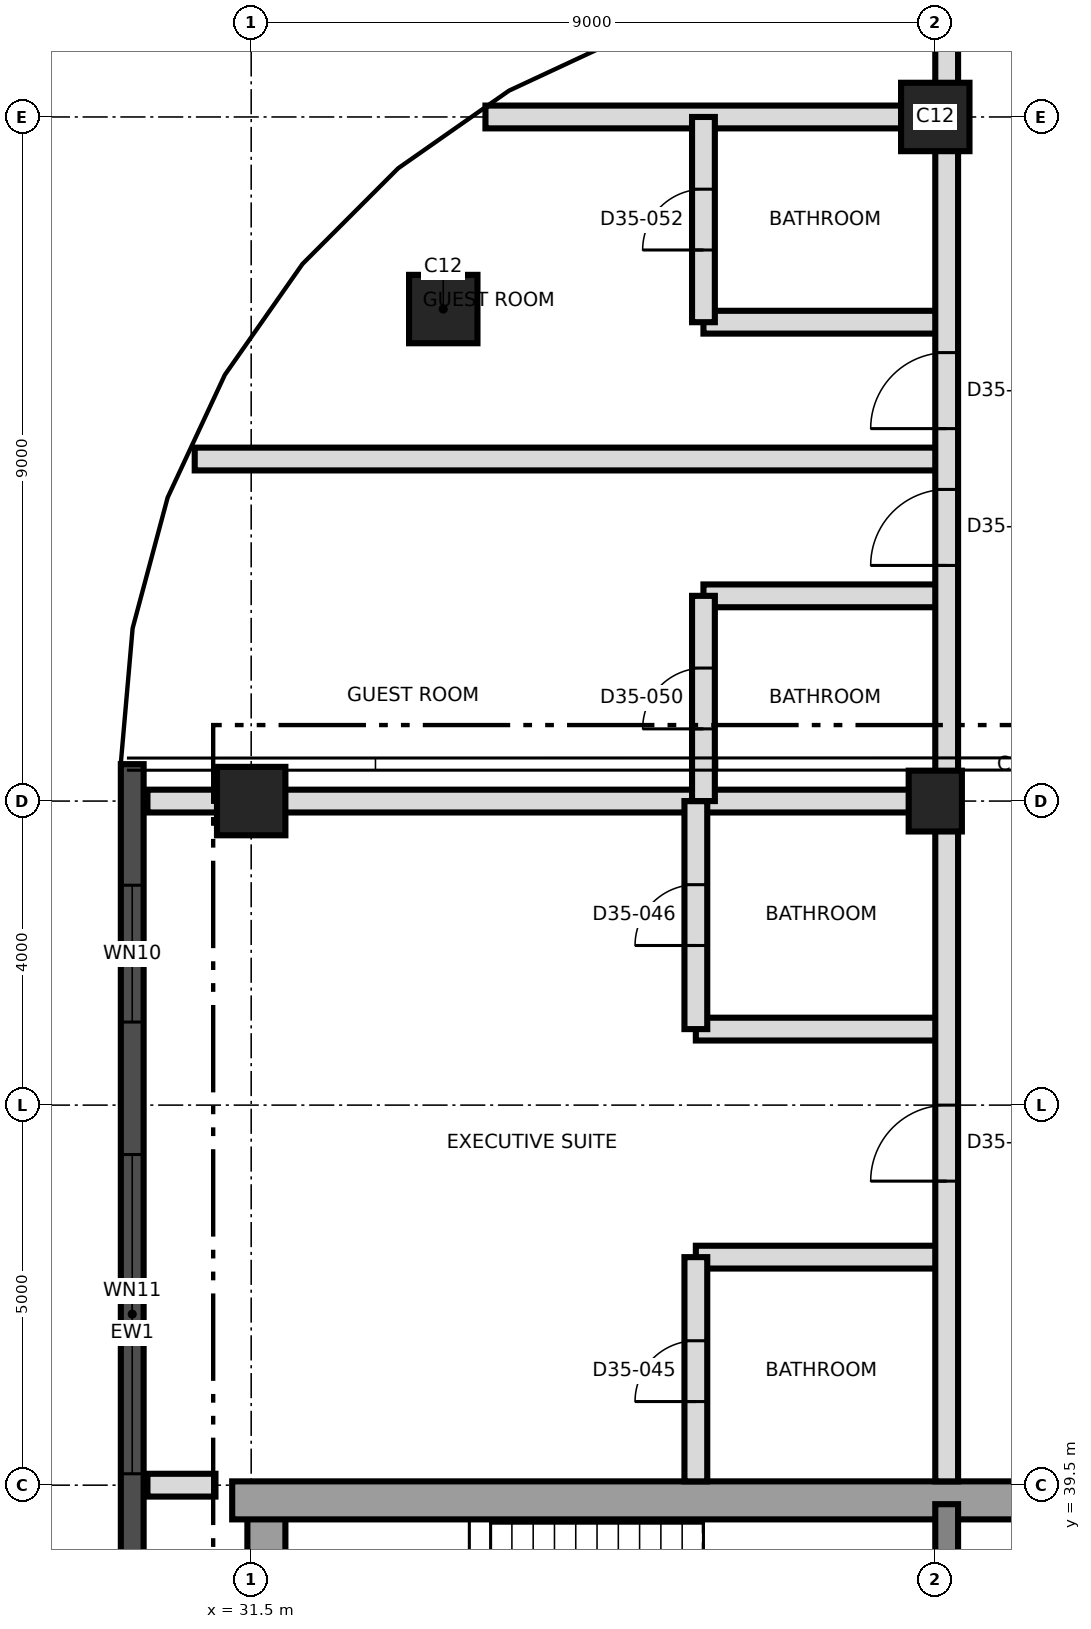
"""IFC4 building model, lengths in metres.
Left out: names, types, materials, properties, quantities, classifications, styles, units other than length and angle.
Written with IfcOpenShell. Run it as: python <this file> out.ifc"""

import sys

from ifc_helpers import new_model, si_unit, direction, frame, frame_2d, origin, origin_2d, place, context, subcontext, project, spatial, rectangle, extrude, element, fill, save


model = new_model("IFC4")
c1 = context("Model", 3, precision=1e-05, world=origin(), true_north=direction((0.0, 1.0)))
c2 = subcontext(c1, "Body", "Model", "MODEL_VIEW")
j1 = project(units=[si_unit("LENGTHUNIT", "METRE"), si_unit("PLANEANGLEUNIT", "RADIAN")], contexts=[c1])
p1 = place(None, origin())
s1 = spatial("IfcSite", under=j1, at=p1, CompositionType="ELEMENT")
p2 = place(p1, origin())
s2 = spatial("IfcBuilding", under=s1, at=p2, CompositionType="ELEMENT")
p3 = place(p2, frame((0.0, 0.0, 195.8)))
s3 = spatial("IfcBuildingStorey", under=s2, at=p3, CompositionType="ELEMENT", Elevation=195.8)
p4 = place(p3, frame((31.7, 21.75, 0.0), z_axis=(0.0, 0.0, 1.0), x_axis=(0.0, 1.0, 0.0)))
e1 = element("IfcWall", 1, at=p4, inside=s3, PredefinedType="SHEAR", context=c2, shape_type="SweptSolid", body=[
    extrude(rectangle(XDim=17.5, YDim=0.5, at=frame_2d((8.75, 0.0))), origin(), (0.0, 0.0, 1.0), 3.7),
])
p5 = place(p3, frame((31.25, 39.3, 0.0), z_axis=(0.0, 0.0, 1.0), x_axis=(1.0, 0.0, 0.0)))
e2 = element("IfcWall", 2, at=p5, inside=s3, PredefinedType="SHEAR", context=c2, shape_type="SweptSolid", body=[
    extrude(rectangle(XDim=27.0, YDim=0.5, at=frame_2d((13.5, 0.0))), origin(), (0.0, 0.0, 1.0), 3.7),
])
p6 = place(p5, frame((10.45, 0.0, 0.0)))
e3 = element("IfcOpeningElement", 3, at=p6, cuts=e2, PredefinedType="OPENING", context=c2, shape_type="SweptSolid", body=[
    extrude(rectangle(XDim=1.2, YDim=2.1, at=frame_2d((0.6, 1.05))), frame((0.0, 0.26, 0.0), z_axis=(0.0, -1.0, 0.0), x_axis=(1.0, 0.0, 0.0)), (0.0, 0.0, 1.0), 0.52),
])
p7 = place(p3, frame((40.65, 33.5, 0.0), z_axis=(0.0, 0.0, 1.0), x_axis=(0.0, 1.0, 0.0)))
e4 = element("IfcWall", 4, at=p7, inside=s3, PredefinedType="SHEAR", context=c2, shape_type="SweptSolid", body=[
    extrude(rectangle(XDim=5.75, YDim=0.3, at=frame_2d((2.875, 0.0))), origin(), (0.0, 0.0, 1.0), 3.7),
])
p8 = place(p3, frame((31.5, 48.5, 0.0), z_axis=(0.0, 0.0, 1.0), x_axis=(1.0, 0.0, 0.0)))
e5 = element("IfcColumn", 5, at=p8, inside=s3, PredefinedType="COLUMN", context=c2, shape_type="SweptSolid", body=[
    extrude(rectangle(XDim=0.9, YDim=0.9, at=origin_2d()), origin(), (0.0, 0.0, 1.0), 3.7),
])
p9 = place(p3, frame((40.5, 48.5, 0.0), z_axis=(0.0, 0.0, 1.0), x_axis=(0.0, 1.0, 0.0)))
e6 = element("IfcColumn", 6, at=p9, inside=s3, PredefinedType="COLUMN", context=c2, shape_type="SweptSolid", body=[
    extrude(rectangle(XDim=0.8, YDim=0.7, at=origin_2d()), origin(), (0.0, 0.0, 1.0), 3.7),
])
for number, where, z_axis, x_axis in (
    (7, (34.027, 54.973, 0.0), (0.0, 0.0, 1.0), (1.0, 0.0, 0.0)),
    (8, (40.5, 57.5, 0.0), (0.0, 0.0, 1.0), (1.0, 0.0, 0.0)),
):
    element("IfcColumn", number, at=place(p3, frame(where, z_axis=z_axis, x_axis=x_axis)), inside=s3, PredefinedType="COLUMN", context=c2, shape_type="SweptSolid", body=[
        extrude(rectangle(XDim=0.9, YDim=0.9, at=origin_2d()), origin(), (0.0, 0.0, 1.0), 3.7),
    ])
p10 = place(p3, frame((29.935, 48.986, 0.0), z_axis=(0.0, 0.0, 1.0), x_axis=(0.0, -1.0, 0.0)))
e9 = element("IfcWall", 9, at=p10, inside=s3, PredefinedType="SOLIDWALL", context=c2, shape_type="SweptSolid", body=[
    extrude(rectangle(XDim=14.976, YDim=0.3, at=frame_2d((7.488, 0.0))), origin(), (0.0, 0.0, 1.0), 3.4),
])
p11 = place(p10, frame((1.593, 0.0, 0.3)))
e10 = element("IfcOpeningElement", 10, at=p11, cuts=e9, PredefinedType="OPENING", context=c2, shape_type="SweptSolid", body=[
    extrude(rectangle(XDim=1.8, YDim=2.4, at=frame_2d((0.9, 1.2))), frame((0.0, 0.16, 0.0), z_axis=(0.0, -1.0, 0.0), x_axis=(1.0, 0.0, 0.0)), (0.0, 0.0, 1.0), 0.32),
])
p12 = place(p10, frame((5.136, 0.0, 0.9)))
e11 = element("IfcOpeningElement", 11, at=p12, cuts=e9, PredefinedType="OPENING", context=c2, shape_type="SweptSolid", body=[
    extrude(rectangle(XDim=4.2, YDim=1.5, at=frame_2d((2.1, 0.75))), frame((0.0, 0.16, 0.0), z_axis=(0.0, -1.0, 0.0), x_axis=(1.0, 0.0, 0.0)), (0.0, 0.0, 1.0), 0.32),
])
p13 = place(p10, frame((11.331, 0.0, 0.3)))
e12 = element("IfcOpeningElement", 12, at=p13, cuts=e9, PredefinedType="OPENING", context=c2, shape_type="SweptSolid", body=[
    extrude(rectangle(XDim=1.8, YDim=2.4, at=frame_2d((0.9, 1.2))), frame((0.0, 0.16, 0.0), z_axis=(0.0, -1.0, 0.0), x_axis=(1.0, 0.0, 0.0)), (0.0, 0.0, 1.0), 0.32),
])
p14 = place(p3, frame((30.135, 39.5, 0.0), z_axis=(0.0, 0.0, 1.0), x_axis=(1.0, 0.0, 0.0)))
e13 = element("IfcWall", 13, at=p14, inside=s3, PredefinedType="PARTITIONING", context=c2, shape_type="SweptSolid", body=[
    extrude(rectangle(XDim=0.895, YDim=0.3, at=frame_2d((0.448, 0.0))), origin(), (0.0, 0.0, 1.0), 3.4),
])
for number, where, z_axis, x_axis in (
    (14, (37.35, 42.5, 0.0), (0.0, 0.0, 1.0), (1.0, 0.0, 0.0)),
    (15, (37.35, 45.5, 0.0), (0.0, 0.0, 1.0), (1.0, 0.0, 0.0)),
):
    element("IfcWall", number, at=place(p3, frame(where, z_axis=z_axis, x_axis=x_axis)), inside=s3, PredefinedType="PARTITIONING", context=c2, shape_type="SweptSolid", body=[
        extrude(rectangle(XDim=3.3, YDim=0.3, at=frame_2d((1.65, 0.0))), origin(), (0.0, 0.0, 1.0), 3.4),
    ])
p15 = place(p3, frame((30.135, 48.5, 0.0), z_axis=(0.0, 0.0, 1.0), x_axis=(1.0, 0.0, 0.0)))
e16 = element("IfcWall", 16, at=p15, inside=s3, PredefinedType="PARTITIONING", context=c2, shape_type="SweptSolid", body=[
    extrude(rectangle(XDim=10.515, YDim=0.3, at=frame_2d((5.257, 0.0))), origin(), (0.0, 0.0, 1.0), 3.4),
])
p16 = place(p3, frame((37.45, 51.2, 0.0), z_axis=(0.0, 0.0, 1.0), x_axis=(1.0, 0.0, 0.0)))
e17 = element("IfcWall", 17, at=p16, inside=s3, PredefinedType="PARTITIONING", context=c2, shape_type="SweptSolid", body=[
    extrude(rectangle(XDim=3.2, YDim=0.3, at=frame_2d((1.6, 0.0))), origin(), (0.0, 0.0, 1.0), 3.4),
])
p17 = place(p3, frame((30.757, 53.0, 0.0), z_axis=(0.0, 0.0, 1.0), x_axis=(1.0, 0.0, 0.0)))
e18 = element("IfcWall", 18, at=p17, inside=s3, PredefinedType="PARTITIONING", context=c2, shape_type="SweptSolid", body=[
    extrude(rectangle(XDim=9.893, YDim=0.3, at=frame_2d((4.946, 0.0))), origin(), (0.0, 0.0, 1.0), 3.4),
])
p18 = place(p3, frame((37.45, 54.8, 0.0), z_axis=(0.0, 0.0, 1.0), x_axis=(1.0, 0.0, 0.0)))
e19 = element("IfcWall", 19, at=p18, inside=s3, PredefinedType="PARTITIONING", context=c2, shape_type="SweptSolid", body=[
    extrude(rectangle(XDim=3.2, YDim=0.3, at=frame_2d((1.6, 0.0))), origin(), (0.0, 0.0, 1.0), 3.4),
])
p19 = place(p3, frame((34.582, 57.5, 0.0), z_axis=(0.0, 0.0, 1.0), x_axis=(1.0, 0.0, 0.0)))
e20 = element("IfcWall", 20, at=p19, inside=s3, PredefinedType="PARTITIONING", context=c2, shape_type="SweptSolid", body=[
    extrude(rectangle(XDim=6.068, YDim=0.3, at=frame_2d((3.034, 0.0))), origin(), (0.0, 0.0, 1.0), 3.4),
])
p20 = place(p3, frame((37.35, 39.55, 0.0), z_axis=(0.0, 0.0, 1.0), x_axis=(0.0, 1.0, 0.0)))
e21 = element("IfcWall", 21, at=p20, inside=s3, PredefinedType="PARTITIONING", context=c2, shape_type="SweptSolid", body=[
    extrude(rectangle(XDim=2.95, YDim=0.3, at=frame_2d((1.475, 0.0))), origin(), (0.0, 0.0, 1.0), 3.4),
])
p21 = place(p20, frame((1.05, 0.0, 0.0)))
e22 = element("IfcOpeningElement", 22, at=p21, cuts=e21, PredefinedType="OPENING", context=c2, shape_type="SweptSolid", body=[
    extrude(rectangle(XDim=0.8, YDim=2.1, at=frame_2d((0.4, 1.05))), frame((0.0, 0.16, 0.0), z_axis=(0.0, -1.0, 0.0), x_axis=(1.0, 0.0, 0.0)), (0.0, 0.0, 1.0), 0.32),
])
p22 = place(p3, frame((37.35, 45.5, 0.0), z_axis=(0.0, 0.0, 1.0), x_axis=(0.0, 1.0, 0.0)))
e23 = element("IfcWall", 23, at=p22, inside=s3, PredefinedType="PARTITIONING", context=c2, shape_type="SweptSolid", body=[
    extrude(rectangle(XDim=3.0, YDim=0.3, at=frame_2d((1.5, 0.0))), origin(), (0.0, 0.0, 1.0), 3.4),
])
p23 = place(p22, frame((1.1, 0.0, 0.0)))
e24 = element("IfcOpeningElement", 24, at=p23, cuts=e23, PredefinedType="OPENING", context=c2, shape_type="SweptSolid", body=[
    extrude(rectangle(XDim=0.8, YDim=2.1, at=frame_2d((0.4, 1.05))), frame((0.0, 0.16, 0.0), z_axis=(0.0, -1.0, 0.0), x_axis=(1.0, 0.0, 0.0)), (0.0, 0.0, 1.0), 0.32),
])
p24 = place(p3, frame((37.45, 48.5, 0.0), z_axis=(0.0, 0.0, 1.0), x_axis=(0.0, 1.0, 0.0)))
e25 = element("IfcWall", 25, at=p24, inside=s3, PredefinedType="PARTITIONING", context=c2, shape_type="SweptSolid", body=[
    extrude(rectangle(XDim=2.7, YDim=0.3, at=frame_2d((1.35, 0.0))), origin(), (0.0, 0.0, 1.0), 3.4),
])
p25 = place(p24, frame((0.95, 0.0, 0.0)))
e26 = element("IfcOpeningElement", 26, at=p25, cuts=e25, PredefinedType="OPENING", context=c2, shape_type="SweptSolid", body=[
    extrude(rectangle(XDim=0.8, YDim=2.1, at=frame_2d((0.4, 1.05))), frame((0.0, 0.16, 0.0), z_axis=(0.0, -1.0, 0.0), x_axis=(1.0, 0.0, 0.0)), (0.0, 0.0, 1.0), 0.32),
])
p26 = place(p3, frame((37.45, 54.8, 0.0), z_axis=(0.0, 0.0, 1.0), x_axis=(0.0, 1.0, 0.0)))
e27 = element("IfcWall", 27, at=p26, inside=s3, PredefinedType="PARTITIONING", context=c2, shape_type="SweptSolid", body=[
    extrude(rectangle(XDim=2.7, YDim=0.3, at=frame_2d((1.35, 0.0))), origin(), (0.0, 0.0, 1.0), 3.4),
])
p27 = place(p26, frame((0.95, 0.0, 0.0)))
e28 = element("IfcOpeningElement", 28, at=p27, cuts=e27, PredefinedType="OPENING", context=c2, shape_type="SweptSolid", body=[
    extrude(rectangle(XDim=0.8, YDim=2.1, at=frame_2d((0.4, 1.05))), frame((0.0, 0.16, 0.0), z_axis=(0.0, -1.0, 0.0), x_axis=(1.0, 0.0, 0.0)), (0.0, 0.0, 1.0), 0.32),
])
p28 = place(p3, frame((40.65, 39.55, 0.0), z_axis=(0.0, 0.0, 1.0), x_axis=(0.0, 1.0, 0.0)))
e29 = element("IfcWall", 29, at=p28, inside=s3, PredefinedType="PARTITIONING", context=c2, shape_type="SweptSolid", body=[
    extrude(rectangle(XDim=19.0, YDim=0.3, at=frame_2d((9.5, 0.0))), origin(), (0.0, 0.0, 1.0), 3.4),
])
p29 = place(p28, frame((3.95, 0.0, 0.0)))
e30 = element("IfcOpeningElement", 30, at=p29, cuts=e29, PredefinedType="OPENING", context=c2, shape_type="SweptSolid", body=[
    extrude(rectangle(XDim=1.0, YDim=2.4, at=frame_2d((0.5, 1.2))), frame((0.0, 0.16, 0.0), z_axis=(0.0, -1.0, 0.0), x_axis=(1.0, 0.0, 0.0)), (0.0, 0.0, 1.0), 0.32),
])
p30 = place(p28, frame((12.05, 0.0, 0.0)))
e31 = element("IfcOpeningElement", 31, at=p30, cuts=e29, PredefinedType="OPENING", context=c2, shape_type="SweptSolid", body=[
    extrude(rectangle(XDim=1.0, YDim=2.1, at=frame_2d((0.5, 1.05))), frame((0.0, 0.16, 0.0), z_axis=(0.0, -1.0, 0.0), x_axis=(1.0, 0.0, 0.0)), (0.0, 0.0, 1.0), 0.32),
])
p31 = place(p28, frame((13.85, 0.0, 0.0)))
e32 = element("IfcOpeningElement", 32, at=p31, cuts=e29, PredefinedType="OPENING", context=c2, shape_type="SweptSolid", body=[
    extrude(rectangle(XDim=1.0, YDim=2.1, at=frame_2d((0.5, 1.05))), frame((0.0, 0.16, 0.0), z_axis=(0.0, -1.0, 0.0), x_axis=(1.0, 0.0, 0.0)), (0.0, 0.0, 1.0), 0.32),
])
p32 = place(p11, origin())
e33 = element("IfcWindow", 33, at=p32, inside=s3, PartitioningType="SINGLE_PANEL", PredefinedType="WINDOW", context=c2, shape_type="SweptSolid", body=[
    extrude(rectangle(XDim=1.8, YDim=2.4, at=frame_2d((0.9, 1.2))), frame((0.0, 0.03, 0.0), z_axis=(0.0, -1.0, 0.0), x_axis=(1.0, 0.0, 0.0)), (0.0, 0.0, 1.0), 0.06),
])
fill(e10, e33)
p33 = place(p12, origin())
e34 = element("IfcWindow", 34, at=p33, inside=s3, PartitioningType="SINGLE_PANEL", PredefinedType="WINDOW", context=c2, shape_type="SweptSolid", body=[
    extrude(rectangle(XDim=4.2, YDim=1.5, at=frame_2d((2.1, 0.75))), frame((0.0, 0.03, 0.0), z_axis=(0.0, -1.0, 0.0), x_axis=(1.0, 0.0, 0.0)), (0.0, 0.0, 1.0), 0.06),
])
fill(e11, e34)
p34 = place(p21, origin())
e35 = element("IfcDoor", 35, at=p34, inside=s3, OperationType="SINGLE_SWING_LEFT", PredefinedType="DOOR", context=c2, shape_type="SweptSolid", body=[
    extrude(rectangle(XDim=0.8, YDim=2.1, at=frame_2d((0.4, 1.05))), frame((0.0, 0.025, 0.0), z_axis=(0.0, -1.0, 0.0), x_axis=(1.0, 0.0, 0.0)), (0.0, 0.0, 1.0), 0.05),
])
fill(e22, e35)
p35 = place(p23, origin())
e36 = element("IfcDoor", 36, at=p35, inside=s3, OperationType="SINGLE_SWING_RIGHT", PredefinedType="DOOR", context=c2, shape_type="SweptSolid", body=[
    extrude(rectangle(XDim=0.8, YDim=2.1, at=frame_2d((0.4, 1.05))), frame((0.0, 0.025, 0.0), z_axis=(0.0, -1.0, 0.0), x_axis=(1.0, 0.0, 0.0)), (0.0, 0.0, 1.0), 0.05),
])
fill(e24, e36)
p36 = place(p29, origin())
e37 = element("IfcDoor", 37, at=p36, inside=s3, OperationType="SINGLE_SWING_LEFT", PredefinedType="DOOR", context=c2, shape_type="SweptSolid", body=[
    extrude(rectangle(XDim=1.0, YDim=2.4, at=frame_2d((0.5, 1.2))), frame((0.0, 0.025, 0.0), z_axis=(0.0, -1.0, 0.0), x_axis=(1.0, 0.0, 0.0)), (0.0, 0.0, 1.0), 0.05),
])
fill(e30, e37)
p37 = place(p25, origin())
e38 = element("IfcDoor", 38, at=p37, inside=s3, OperationType="SINGLE_SWING_LEFT", PredefinedType="DOOR", context=c2, shape_type="SweptSolid", body=[
    extrude(rectangle(XDim=0.8, YDim=2.1, at=frame_2d((0.4, 1.05))), frame((0.0, 0.025, 0.0), z_axis=(0.0, -1.0, 0.0), x_axis=(1.0, 0.0, 0.0)), (0.0, 0.0, 1.0), 0.05),
])
fill(e26, e38)
p38 = place(p30, origin())
e39 = element("IfcDoor", 39, at=p38, inside=s3, OperationType="SINGLE_SWING_RIGHT", PredefinedType="DOOR", context=c2, shape_type="SweptSolid", body=[
    extrude(rectangle(XDim=1.0, YDim=2.1, at=frame_2d((0.5, 1.05))), frame((0.0, 0.025, 0.0), z_axis=(0.0, -1.0, 0.0), x_axis=(1.0, 0.0, 0.0)), (0.0, 0.0, 1.0), 0.05),
])
fill(e31, e39)
p39 = place(p27, origin())
e40 = element("IfcDoor", 40, at=p39, inside=s3, OperationType="SINGLE_SWING_RIGHT", PredefinedType="DOOR", context=c2, shape_type="SweptSolid", body=[
    extrude(rectangle(XDim=0.8, YDim=2.1, at=frame_2d((0.4, 1.05))), frame((0.0, 0.025, 0.0), z_axis=(0.0, -1.0, 0.0), x_axis=(1.0, 0.0, 0.0)), (0.0, 0.0, 1.0), 0.05),
])
fill(e28, e40)
p40 = place(p31, origin())
e41 = element("IfcDoor", 41, at=p40, inside=s3, OperationType="SINGLE_SWING_LEFT", PredefinedType="DOOR", context=c2, shape_type="SweptSolid", body=[
    extrude(rectangle(XDim=1.0, YDim=2.1, at=frame_2d((0.5, 1.05))), frame((0.0, 0.025, 0.0), z_axis=(0.0, -1.0, 0.0), x_axis=(1.0, 0.0, 0.0)), (0.0, 0.0, 1.0), 0.05),
])
fill(e32, e41)
save(model, sys.argv[1])
